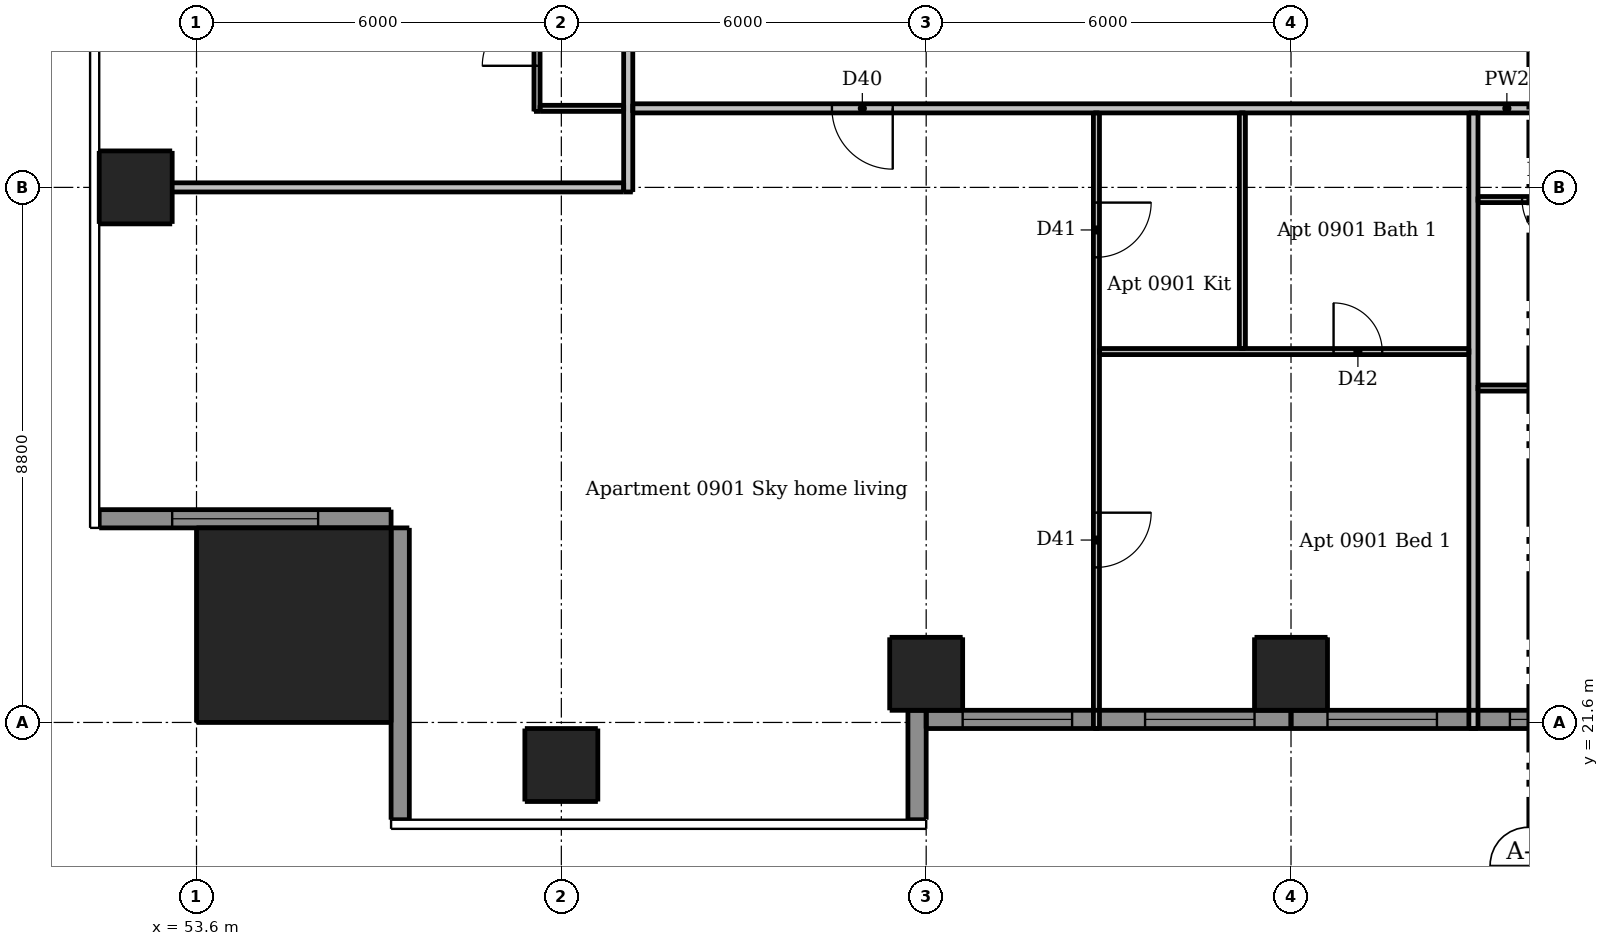
"""IFC4 building model, lengths in metres.
Left out: names, types, materials, properties, quantities, classifications, styles, units other than length and angle.
Written with IfcOpenShell. Run it as: python <this file> out.ifc"""

import sys

from ifc_helpers import new_model, si_unit, direction, frame, frame_2d, origin, origin_2d, place, context, subcontext, project, spatial, rectangle, extrude, element, fill, save


model = new_model("IFC4")
c1 = context("Model", 3, precision=1e-05, world=origin(), true_north=direction((0.0, 1.0)))
c2 = subcontext(c1, "Body", "Model", "MODEL_VIEW")
j1 = project(units=[si_unit("LENGTHUNIT", "METRE"), si_unit("PLANEANGLEUNIT", "RADIAN")], contexts=[c1])
p1 = place(None, origin())
s1 = spatial("IfcSite", under=j1, at=p1, CompositionType="ELEMENT")
p2 = place(p1, origin())
s2 = spatial("IfcBuilding", under=s1, at=p2, CompositionType="ELEMENT")
p3 = place(p2, frame((0.0, 0.0, 36.7)))
s3 = spatial("IfcBuildingStorey", under=s2, at=p3, CompositionType="ELEMENT", Elevation=36.7)
for number, where, z_axis, x_axis in (
    (1, (59.6, 20.9, 0.0), (0.0, 0.0, 1.0), (1.0, 0.0, 0.0)),
    (2, (65.6, 22.4, 0.0), (0.0, 0.0, 1.0), (1.0, 0.0, 0.0)),
    (3, (71.6, 22.4, 0.0), (0.0, 0.0, 1.0), (1.0, 0.0, 0.0)),
    (4, (52.6, 30.4, 0.0), (0.0, 0.0, 1.0), (1.0, 0.0, 0.0)),
):
    element("IfcColumn", number, at=place(p3, frame(where, z_axis=z_axis, x_axis=x_axis)), inside=s3, PredefinedType="COLUMN", context=c2, shape_type="SweptSolid", body=[
        extrude(rectangle(XDim=1.2, YDim=1.2, at=origin_2d()), origin(), (0.0, 0.0, 1.0), 3.05),
    ])
p4 = place(p3, frame((55.2, 23.2, 0.0), z_axis=(0.0, 0.0, 1.0), x_axis=(1.0, 0.0, 0.0)))
e5 = element("IfcColumn", 5, at=p4, inside=s3, PredefinedType="COLUMN", context=c2, shape_type="SweptSolid", body=[
    extrude(rectangle(XDim=3.2, YDim=3.2, at=origin_2d()), origin(), (0.0, 0.0, 1.0), 3.3),
])
p5 = place(p3, frame((65.45, 20.0, 0.0), z_axis=(0.0, 0.0, 1.0), x_axis=(0.0, 1.0, 0.0)))
e6 = element("IfcWall", 6, at=p5, inside=s3, PredefinedType="SOLIDWALL", context=c2, shape_type="SweptSolid", body=[
    extrude(rectangle(XDim=1.8, YDim=0.3, at=frame_2d((0.9, 0.0))), origin(), (0.0, 0.0, 1.0), 3.05),
])
p6 = place(p3, frame((52.0, 24.95, 0.0), z_axis=(0.0, 0.0, 1.0), x_axis=(1.0, 0.0, 0.0)))
e7 = element("IfcWall", 7, at=p6, inside=s3, PredefinedType="SOLIDWALL", context=c2, shape_type="SweptSolid", body=[
    extrude(rectangle(XDim=4.8, YDim=0.3, at=frame_2d((2.4, 0.0))), origin(), (0.0, 0.0, 1.0), 3.05),
])
p7 = place(p6, frame((1.2, 0.0, 0.15)))
e8 = element("IfcOpeningElement", 8, at=p7, cuts=e7, PredefinedType="OPENING", context=c2, shape_type="SweptSolid", body=[
    extrude(rectangle(XDim=2.4, YDim=2.1, at=frame_2d((1.2, 1.05))), frame((0.0, 0.16, 0.0), z_axis=(0.0, -1.0, 0.0), x_axis=(1.0, 0.0, 0.0)), (0.0, 0.0, 1.0), 0.32),
])
p8 = place(p3, frame((56.95, 24.8, 0.0), z_axis=(0.0, 0.0, 1.0), x_axis=(0.0, -1.0, 0.0)))
e9 = element("IfcWall", 9, at=p8, inside=s3, PredefinedType="SOLIDWALL", context=c2, shape_type="SweptSolid", body=[
    extrude(rectangle(XDim=4.8, YDim=0.3, at=frame_2d((2.4, 0.0))), origin(), (0.0, 0.0, 1.0), 3.05),
])
p9 = place(p3, frame((65.6, 21.65, 0.0), z_axis=(0.0, 0.0, 1.0), x_axis=(1.0, 0.0, 0.0)))
e10 = element("IfcWall", 10, at=p9, inside=s3, PredefinedType="SOLIDWALL", context=c2, shape_type="SweptSolid", body=[
    extrude(rectangle(XDim=6.0, YDim=0.3, at=frame_2d((3.0, 0.0))), origin(), (0.0, 0.0, 1.0), 3.05),
])
p10 = place(p9, frame((0.6, 0.0, 0.15)))
e11 = element("IfcOpeningElement", 11, at=p10, cuts=e10, PredefinedType="OPENING", context=c2, shape_type="SweptSolid", body=[
    extrude(rectangle(XDim=1.8, YDim=2.1, at=frame_2d((0.9, 1.05))), frame((0.0, 0.16, 0.0), z_axis=(0.0, -1.0, 0.0), x_axis=(1.0, 0.0, 0.0)), (0.0, 0.0, 1.0), 0.32),
])
p11 = place(p9, frame((3.6, 0.0, 0.15)))
e12 = element("IfcOpeningElement", 12, at=p11, cuts=e10, PredefinedType="OPENING", context=c2, shape_type="SweptSolid", body=[
    extrude(rectangle(XDim=1.8, YDim=2.1, at=frame_2d((0.9, 1.05))), frame((0.0, 0.16, 0.0), z_axis=(0.0, -1.0, 0.0), x_axis=(1.0, 0.0, 0.0)), (0.0, 0.0, 1.0), 0.32),
])
p12 = place(p3, frame((71.6, 21.65, 0.0), z_axis=(0.0, 0.0, 1.0), x_axis=(1.0, 0.0, 0.0)))
e13 = element("IfcWall", 13, at=p12, inside=s3, PredefinedType="SOLIDWALL", context=c2, shape_type="SweptSolid", body=[
    extrude(rectangle(XDim=5.7, YDim=0.3, at=frame_2d((2.85, 0.0))), origin(), (0.0, 0.0, 1.0), 3.05),
])
p13 = place(p12, frame((0.6, 0.0, 0.15)))
e14 = element("IfcOpeningElement", 14, at=p13, cuts=e13, PredefinedType="OPENING", context=c2, shape_type="SweptSolid", body=[
    extrude(rectangle(XDim=1.8, YDim=2.1, at=frame_2d((0.9, 1.05))), frame((0.0, 0.16, 0.0), z_axis=(0.0, -1.0, 0.0), x_axis=(1.0, 0.0, 0.0)), (0.0, 0.0, 1.0), 0.32),
])
p14 = place(p12, frame((3.6, 0.0, 0.15)))
e15 = element("IfcOpeningElement", 15, at=p14, cuts=e13, PredefinedType="OPENING", context=c2, shape_type="SweptSolid", body=[
    extrude(rectangle(XDim=1.8, YDim=2.1, at=frame_2d((0.9, 1.05))), frame((0.0, 0.16, 0.0), z_axis=(0.0, -1.0, 0.0), x_axis=(1.0, 0.0, 0.0)), (0.0, 0.0, 1.0), 0.32),
])
p15 = place(p3, frame((59.2, 31.65, 0.0), z_axis=(0.0, 0.0, 1.0), x_axis=(0.0, 1.0, 0.0)))
e16 = element("IfcWall", 16, at=p15, inside=s3, PredefinedType="PARTITIONING", context=c2, shape_type="SweptSolid", body=[
    extrude(rectangle(XDim=16.675, YDim=0.1, at=frame_2d((8.337, 0.0))), origin(), (0.0, 0.0, 1.0), 3.05),
])
p16 = place(p15, frame((9.7, 0.0, 0.0)))
e17 = element("IfcOpeningElement", 17, at=p16, cuts=e16, PredefinedType="OPENING", context=c2, shape_type="SweptSolid", body=[
    extrude(rectangle(XDim=0.9, YDim=2.1, at=frame_2d((0.45, 1.05))), frame((0.0, 0.06, 0.0), z_axis=(0.0, -1.0, 0.0), x_axis=(1.0, 0.0, 0.0)), (0.0, 0.0, 1.0), 0.12),
])
p17 = place(p15, frame((14.8, 0.0, 0.0)))
e18 = element("IfcOpeningElement", 18, at=p17, cuts=e16, PredefinedType="OPENING", context=c2, shape_type="SweptSolid", body=[
    extrude(rectangle(XDim=0.9, YDim=2.1, at=frame_2d((0.45, 1.05))), frame((0.0, 0.06, 0.0), z_axis=(0.0, -1.0, 0.0), x_axis=(1.0, 0.0, 0.0)), (0.0, 0.0, 1.0), 0.12),
])
p18 = place(p15, frame((5.25, 0.0, 0.0)))
e19 = element("IfcOpeningElement", 19, at=p18, cuts=e16, PredefinedType="OPENING", context=c2, shape_type="SweptSolid", body=[
    extrude(rectangle(XDim=0.8, YDim=2.1, at=frame_2d((0.4, 1.05))), frame((0.0, 0.06, 0.0), z_axis=(0.0, -1.0, 0.0), x_axis=(1.0, 0.0, 0.0)), (0.0, 0.0, 1.0), 0.12),
])
p19 = place(p15, frame((0.75, 0.0, 0.0)))
e20 = element("IfcOpeningElement", 20, at=p19, cuts=e16, PredefinedType="OPENING", context=c2, shape_type="SweptSolid", body=[
    extrude(rectangle(XDim=0.9, YDim=2.1, at=frame_2d((0.45, 1.05))), frame((0.0, 0.06, 0.0), z_axis=(0.0, -1.0, 0.0), x_axis=(1.0, 0.0, 0.0)), (0.0, 0.0, 1.0), 0.12),
])
p20 = place(p15, frame((3.15, 0.0, 0.0)))
e21 = element("IfcOpeningElement", 21, at=p20, cuts=e16, PredefinedType="OPENING", context=c2, shape_type="SweptSolid", body=[
    extrude(rectangle(XDim=0.8, YDim=2.1, at=frame_2d((0.4, 1.05))), frame((0.0, 0.06, 0.0), z_axis=(0.0, -1.0, 0.0), x_axis=(1.0, 0.0, 0.0)), (0.0, 0.0, 1.0), 0.12),
])
p21 = place(p3, frame((68.4, 31.625, 0.0), z_axis=(0.0, 0.0, 1.0), x_axis=(0.0, -1.0, 0.0)))
e22 = element("IfcWall", 22, at=p21, inside=s3, PredefinedType="PARTITIONING", context=c2, shape_type="SweptSolid", body=[
    extrude(rectangle(XDim=10.125, YDim=0.1, at=frame_2d((5.062, 0.0))), origin(), (0.0, 0.0, 1.0), 3.05),
])
p22 = place(p21, frame((1.475, 0.0, 0.0)))
e23 = element("IfcOpeningElement", 23, at=p22, cuts=e22, PredefinedType="OPENING", context=c2, shape_type="SweptSolid", body=[
    extrude(rectangle(XDim=0.9, YDim=2.1, at=frame_2d((0.45, 1.05))), frame((0.0, 0.06, 0.0), z_axis=(0.0, -1.0, 0.0), x_axis=(1.0, 0.0, 0.0)), (0.0, 0.0, 1.0), 0.12),
])
p23 = place(p21, frame((6.575, 0.0, 0.0)))
e24 = element("IfcOpeningElement", 24, at=p23, cuts=e22, PredefinedType="OPENING", context=c2, shape_type="SweptSolid", body=[
    extrude(rectangle(XDim=0.9, YDim=2.1, at=frame_2d((0.45, 1.05))), frame((0.0, 0.06, 0.0), z_axis=(0.0, -1.0, 0.0), x_axis=(1.0, 0.0, 0.0)), (0.0, 0.0, 1.0), 0.12),
])
p24 = place(p3, frame((70.8, 27.75, 0.0), z_axis=(0.0, 0.0, 1.0), x_axis=(0.0, 1.0, 0.0)))
e25 = element("IfcWall", 25, at=p24, inside=s3, PredefinedType="PARTITIONING", context=c2, shape_type="SweptSolid", body=[
    extrude(rectangle(XDim=3.875, YDim=0.1, at=frame_2d((1.938, 0.0))), origin(), (0.0, 0.0, 1.0), 3.05),
])
p25 = place(p3, frame((59.25, 31.7, 0.0), z_axis=(0.0, 0.0, 1.0), x_axis=(1.0, 0.0, 0.0)))
e26 = element("IfcWall", 26, at=p25, inside=s3, PredefinedType="PARTITIONING", context=c2, shape_type="SweptSolid", body=[
    extrude(rectangle(XDim=1.375, YDim=0.1, at=frame_2d((0.688, 0.0))), origin(), (0.0, 0.0, 1.0), 3.05),
])
p26 = place(p3, frame((88.25, 30.2, 0.0), z_axis=(0.0, 0.0, 1.0), x_axis=(-1.0, 0.0, 0.0)))
e27 = element("IfcWall", 27, at=p26, inside=s3, PredefinedType="PARTITIONING", context=c2, shape_type="SweptSolid", body=[
    extrude(rectangle(XDim=13.575, YDim=0.1, at=frame_2d((6.788, 0.0))), origin(), (0.0, 0.0, 1.0), 3.05),
])
p27 = place(p26, frame((7.5, 0.0, 0.0)))
e28 = element("IfcOpeningElement", 28, at=p27, cuts=e27, PredefinedType="OPENING", context=c2, shape_type="SweptSolid", body=[
    extrude(rectangle(XDim=0.9, YDim=2.1, at=frame_2d((0.45, 1.05))), frame((0.0, 0.06, 0.0), z_axis=(0.0, -1.0, 0.0), x_axis=(1.0, 0.0, 0.0)), (0.0, 0.0, 1.0), 0.12),
])
p28 = place(p26, frame((2.7, 0.0, 0.0)))
e29 = element("IfcOpeningElement", 29, at=p28, cuts=e27, PredefinedType="OPENING", context=c2, shape_type="SweptSolid", body=[
    extrude(rectangle(XDim=0.9, YDim=2.1, at=frame_2d((0.45, 1.05))), frame((0.0, 0.06, 0.0), z_axis=(0.0, -1.0, 0.0), x_axis=(1.0, 0.0, 0.0)), (0.0, 0.0, 1.0), 0.12),
])
p29 = place(p26, frame((0.35, 0.0, 0.0)))
e30 = element("IfcOpeningElement", 30, at=p29, cuts=e27, PredefinedType="OPENING", context=c2, shape_type="SweptSolid", body=[
    extrude(rectangle(XDim=0.9, YDim=2.1, at=frame_2d((0.45, 1.05))), frame((0.0, 0.06, 0.0), z_axis=(0.0, -1.0, 0.0), x_axis=(1.0, 0.0, 0.0)), (0.0, 0.0, 1.0), 0.12),
])
p30 = place(p26, frame((12.05, 0.0, 0.0)))
e31 = element("IfcOpeningElement", 31, at=p30, cuts=e27, PredefinedType="OPENING", context=c2, shape_type="SweptSolid", body=[
    extrude(rectangle(XDim=0.8, YDim=2.1, at=frame_2d((0.4, 1.05))), frame((0.0, 0.06, 0.0), z_axis=(0.0, -1.0, 0.0), x_axis=(1.0, 0.0, 0.0)), (0.0, 0.0, 1.0), 0.12),
])
p31 = place(p3, frame((68.45, 27.7, 0.0), z_axis=(0.0, 0.0, 1.0), x_axis=(1.0, 0.0, 0.0)))
e32 = element("IfcWall", 32, at=p31, inside=s3, PredefinedType="PARTITIONING", context=c2, shape_type="SweptSolid", body=[
    extrude(rectangle(XDim=6.075, YDim=0.1, at=frame_2d((3.038, 0.0))), origin(), (0.0, 0.0, 1.0), 3.05),
])
p32 = place(p31, frame((3.85, 0.0, 0.0)))
e33 = element("IfcOpeningElement", 33, at=p32, cuts=e32, PredefinedType="OPENING", context=c2, shape_type="SweptSolid", body=[
    extrude(rectangle(XDim=0.8, YDim=2.1, at=frame_2d((0.4, 1.05))), frame((0.0, 0.06, 0.0), z_axis=(0.0, -1.0, 0.0), x_axis=(1.0, 0.0, 0.0)), (0.0, 0.0, 1.0), 0.12),
])
p33 = place(p3, frame((74.675, 27.1, 0.0), z_axis=(0.0, 0.0, 1.0), x_axis=(1.0, 0.0, 0.0)))
e34 = element("IfcWall", 34, at=p33, inside=s3, PredefinedType="PARTITIONING", context=c2, shape_type="SweptSolid", body=[
    extrude(rectangle(XDim=2.275, YDim=0.1, at=frame_2d((1.137, 0.0))), origin(), (0.0, 0.0, 1.0), 3.05),
])
p34 = place(p3, frame((60.7, 30.325, 0.0), z_axis=(0.0, 0.0, 1.0), x_axis=(0.0, 1.0, 0.0)))
e35 = element("IfcWall", 35, at=p34, inside=s3, PredefinedType="PARTITIONING", context=c2, shape_type="SweptSolid", body=[
    extrude(rectangle(XDim=28.9, YDim=0.15, at=frame_2d((14.45, 0.0))), origin(), (0.0, 0.0, 1.0), 3.05),
])
p35 = place(p34, frame((9.225, 0.0, 0.0)))
e36 = element("IfcOpeningElement", 36, at=p35, cuts=e35, PredefinedType="OPENING", context=c2, shape_type="SweptSolid", body=[
    extrude(rectangle(XDim=1.0, YDim=2.1, at=frame_2d((0.5, 1.05))), frame((0.0, 0.085, 0.0), z_axis=(0.0, -1.0, 0.0), x_axis=(1.0, 0.0, 0.0)), (0.0, 0.0, 1.0), 0.17),
])
p36 = place(p34, frame((26.025, 0.0, 0.0)))
e37 = element("IfcOpeningElement", 37, at=p36, cuts=e35, PredefinedType="OPENING", context=c2, shape_type="SweptSolid", body=[
    extrude(rectangle(XDim=1.0, YDim=2.1, at=frame_2d((0.5, 1.05))), frame((0.0, 0.085, 0.0), z_axis=(0.0, -1.0, 0.0), x_axis=(1.0, 0.0, 0.0)), (0.0, 0.0, 1.0), 0.17),
])
p37 = place(p3, frame((74.6, 21.5, 0.0), z_axis=(0.0, 0.0, 1.0), x_axis=(0.0, 1.0, 0.0)))
e38 = element("IfcWall", 38, at=p37, inside=s3, PredefinedType="PARTITIONING", context=c2, shape_type="SweptSolid", body=[
    extrude(rectangle(XDim=10.125, YDim=0.15, at=frame_2d((5.062, 0.0))), origin(), (0.0, 0.0, 1.0), 3.05),
])
p38 = place(p3, frame((89.525, 31.7, 0.0), z_axis=(0.0, 0.0, 1.0), x_axis=(-1.0, 0.0, 0.0)))
e39 = element("IfcWall", 39, at=p38, inside=s3, PredefinedType="PARTITIONING", context=c2, shape_type="SweptSolid", body=[
    extrude(rectangle(XDim=28.75, YDim=0.15, at=frame_2d((14.375, 0.0))), origin(), (0.0, 0.0, 1.0), 3.05),
])
p39 = place(p38, frame((24.475, 0.0, 0.0)))
e40 = element("IfcOpeningElement", 40, at=p39, cuts=e39, PredefinedType="OPENING", context=c2, shape_type="SweptSolid", body=[
    extrude(rectangle(XDim=1.0, YDim=2.1, at=frame_2d((0.5, 1.05))), frame((0.0, 0.085, 0.0), z_axis=(0.0, -1.0, 0.0), x_axis=(1.0, 0.0, 0.0)), (0.0, 0.0, 1.0), 0.17),
])
p40 = place(p38, frame((7.575, 0.0, 0.0)))
e41 = element("IfcOpeningElement", 41, at=p40, cuts=e39, PredefinedType="OPENING", context=c2, shape_type="SweptSolid", body=[
    extrude(rectangle(XDim=1.0, YDim=2.1, at=frame_2d((0.5, 1.05))), frame((0.0, 0.085, 0.0), z_axis=(0.0, -1.0, 0.0), x_axis=(1.0, 0.0, 0.0)), (0.0, 0.0, 1.0), 0.17),
])
p41 = place(p3, frame((52.0, 30.4, 0.0), z_axis=(0.0, 0.0, 1.0), x_axis=(1.0, 0.0, 0.0)))
e42 = element("IfcWall", 42, at=p41, inside=s3, PredefinedType="PARTITIONING", context=c2, shape_type="SweptSolid", body=[
    extrude(rectangle(XDim=8.625, YDim=0.15, at=frame_2d((4.312, 0.0))), origin(), (0.0, 0.0, 1.0), 2.647),
])
p42 = place(p7, origin())
e43 = element("IfcWindow", 43, at=p42, inside=s3, PartitioningType="DOUBLE_PANEL_VERTICAL", PredefinedType="WINDOW", context=c2, shape_type="SweptSolid", body=[
    extrude(rectangle(XDim=2.4, YDim=2.1, at=frame_2d((1.2, 1.05))), frame((0.0, 0.03, 0.0), z_axis=(0.0, -1.0, 0.0), x_axis=(1.0, 0.0, 0.0)), (0.0, 0.0, 1.0), 0.06),
])
fill(e8, e43)
p43 = place(p10, origin())
e44 = element("IfcWindow", 44, at=p43, inside=s3, PartitioningType="DOUBLE_PANEL_VERTICAL", PredefinedType="WINDOW", context=c2, shape_type="SweptSolid", body=[
    extrude(rectangle(XDim=1.8, YDim=2.1, at=frame_2d((0.9, 1.05))), frame((0.0, 0.03, 0.0), z_axis=(0.0, -1.0, 0.0), x_axis=(1.0, 0.0, 0.0)), (0.0, 0.0, 1.0), 0.06),
])
fill(e11, e44)
p44 = place(p11, origin())
e45 = element("IfcWindow", 45, at=p44, inside=s3, PartitioningType="DOUBLE_PANEL_VERTICAL", PredefinedType="WINDOW", context=c2, shape_type="SweptSolid", body=[
    extrude(rectangle(XDim=1.8, YDim=2.1, at=frame_2d((0.9, 1.05))), frame((0.0, 0.03, 0.0), z_axis=(0.0, -1.0, 0.0), x_axis=(1.0, 0.0, 0.0)), (0.0, 0.0, 1.0), 0.06),
])
fill(e12, e45)
p45 = place(p13, origin())
e46 = element("IfcWindow", 46, at=p45, inside=s3, PartitioningType="DOUBLE_PANEL_VERTICAL", PredefinedType="WINDOW", context=c2, shape_type="SweptSolid", body=[
    extrude(rectangle(XDim=1.8, YDim=2.1, at=frame_2d((0.9, 1.05))), frame((0.0, 0.03, 0.0), z_axis=(0.0, -1.0, 0.0), x_axis=(1.0, 0.0, 0.0)), (0.0, 0.0, 1.0), 0.06),
])
fill(e14, e46)
p46 = place(p14, origin())
e47 = element("IfcWindow", 47, at=p46, inside=s3, PartitioningType="DOUBLE_PANEL_VERTICAL", PredefinedType="WINDOW", context=c2, shape_type="SweptSolid", body=[
    extrude(rectangle(XDim=1.8, YDim=2.1, at=frame_2d((0.9, 1.05))), frame((0.0, 0.03, 0.0), z_axis=(0.0, -1.0, 0.0), x_axis=(1.0, 0.0, 0.0)), (0.0, 0.0, 1.0), 0.06),
])
fill(e15, e47)
p47 = place(p39, origin())
e48 = element("IfcDoor", 48, at=p47, inside=s3, OperationType="SINGLE_SWING_LEFT", PredefinedType="DOOR", context=c2, shape_type="SweptSolid", body=[
    extrude(rectangle(XDim=1.0, YDim=2.1, at=frame_2d((0.5, 1.05))), frame((0.0, 0.025, 0.0), z_axis=(0.0, -1.0, 0.0), x_axis=(1.0, 0.0, 0.0)), (0.0, 0.0, 1.0), 0.05),
])
fill(e40, e48)
p48 = place(p22, origin())
e49 = element("IfcDoor", 49, at=p48, inside=s3, OperationType="SINGLE_SWING_LEFT", PredefinedType="DOOR", context=c2, shape_type="SweptSolid", body=[
    extrude(rectangle(XDim=0.9, YDim=2.1, at=frame_2d((0.45, 1.05))), frame((0.0, 0.025, 0.0), z_axis=(0.0, -1.0, 0.0), x_axis=(1.0, 0.0, 0.0)), (0.0, 0.0, 1.0), 0.05),
])
fill(e23, e49)
p49 = place(p23, origin())
e50 = element("IfcDoor", 50, at=p49, inside=s3, OperationType="SINGLE_SWING_LEFT", PredefinedType="DOOR", context=c2, shape_type="SweptSolid", body=[
    extrude(rectangle(XDim=0.9, YDim=2.1, at=frame_2d((0.45, 1.05))), frame((0.0, 0.025, 0.0), z_axis=(0.0, -1.0, 0.0), x_axis=(1.0, 0.0, 0.0)), (0.0, 0.0, 1.0), 0.05),
])
fill(e24, e50)
p50 = place(p32, origin())
e51 = element("IfcDoor", 51, at=p50, inside=s3, OperationType="SINGLE_SWING_LEFT", PredefinedType="DOOR", context=c2, shape_type="SweptSolid", body=[
    extrude(rectangle(XDim=0.8, YDim=2.1, at=frame_2d((0.4, 1.05))), frame((0.0, 0.025, 0.0), z_axis=(0.0, -1.0, 0.0), x_axis=(1.0, 0.0, 0.0)), (0.0, 0.0, 1.0), 0.05),
])
fill(e33, e51)
p51 = place(p30, origin())
e52 = element("IfcDoor", 52, at=p51, inside=s3, OperationType="SINGLE_SWING_LEFT", PredefinedType="DOOR", context=c2, shape_type="SweptSolid", body=[
    extrude(rectangle(XDim=0.8, YDim=2.1, at=frame_2d((0.4, 1.05))), frame((0.0, 0.025, 0.0), z_axis=(0.0, -1.0, 0.0), x_axis=(1.0, 0.0, 0.0)), (0.0, 0.0, 1.0), 0.05),
])
fill(e31, e52)
p52 = place(p19, origin())
e53 = element("IfcDoor", 53, at=p52, inside=s3, OperationType="SINGLE_SWING_LEFT", PredefinedType="DOOR", context=c2, shape_type="SweptSolid", body=[
    extrude(rectangle(XDim=0.9, YDim=2.1, at=frame_2d((0.45, 1.05))), frame((0.0, 0.025, 0.0), z_axis=(0.0, -1.0, 0.0), x_axis=(1.0, 0.0, 0.0)), (0.0, 0.0, 1.0), 0.05),
])
fill(e20, e53)
save(model, sys.argv[1])
